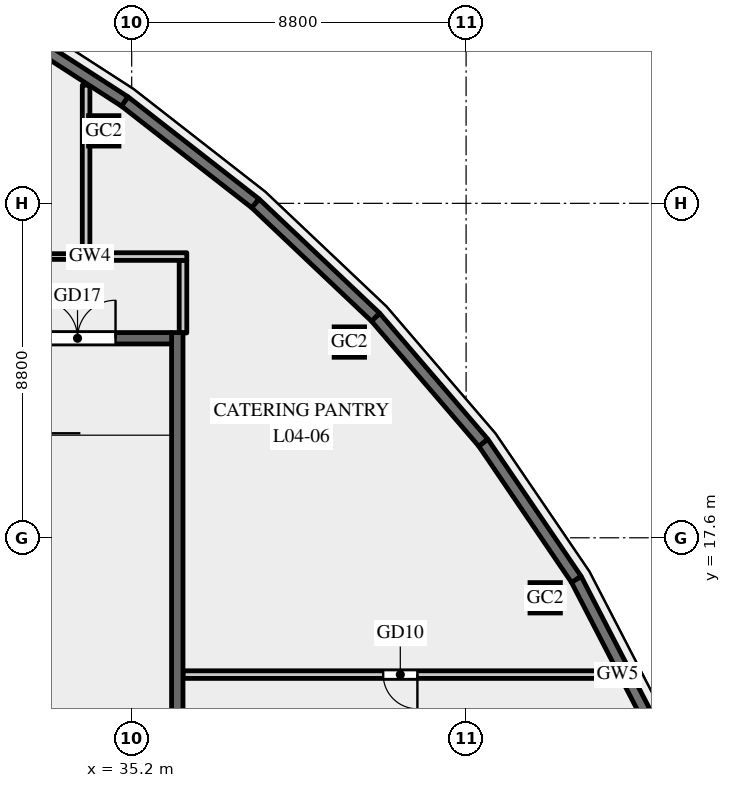
"""IFC4 building model, lengths in metres.
Left out: names, types, materials, properties, quantities, classifications, styles, units other than length and angle.
Written with IfcOpenShell. Run it as: python <this file> out.ifc"""

import sys

from ifc_helpers import new_model, si_unit, direction, frame, frame_2d, origin, origin_2d, place, context, subcontext, project, spatial, rectangle, hollow_rectangle, extrude, element, fill, save


model = new_model("IFC4")
c1 = context("Model", 3, precision=1e-05, world=origin(), true_north=direction((0.0, 1.0)))
c2 = subcontext(c1, "Body", "Model", "MODEL_VIEW")
j1 = project(units=[si_unit("LENGTHUNIT", "METRE"), si_unit("PLANEANGLEUNIT", "RADIAN")], contexts=[c1])
p1 = place(None, origin())
s1 = spatial("IfcSite", under=j1, at=p1, CompositionType="ELEMENT")
p2 = place(p1, origin())
s2 = spatial("IfcBuilding", under=s1, at=p2, CompositionType="ELEMENT")
p3 = place(p2, frame((0.0, 0.0, 25.0)))
s3 = spatial("IfcBuildingStorey", under=s2, at=p3, CompositionType="ELEMENT", Elevation=25.0)
for number, where, z_axis, x_axis in (
    (1, (46.081, 16.021, 0.0), (0.0, 0.0, 1.0), (1.0, 0.0, 0.0)),
    (2, (40.928, 22.75, 0.0), (0.0, 0.0, 1.0), (1.0, 0.0, 0.0)),
    (3, (34.465, 28.307, 0.0), (0.0, 0.0, 1.0), (1.0, 0.0, 0.0)),
):
    element("IfcColumn", number, at=place(p3, frame(where, z_axis=z_axis, x_axis=x_axis)), inside=s3, PredefinedType="COLUMN", context=c2, shape_type="SweptSolid", body=[
        extrude(hollow_rectangle(XDim=0.8, YDim=0.8, WallThickness=0.04, at=origin_2d()), origin(), (0.0, 0.0, 1.0), 5.488),
    ])
p4 = place(p3, frame((34.0, 29.51, 0.0), z_axis=(0.0, 0.0, 1.0), x_axis=(0.0, -1.0, 0.0)))
e4 = element("IfcWall", 4, at=p4, inside=s3, PredefinedType="PARTITIONING", context=c2, shape_type="SweptSolid", body=[
    extrude(rectangle(XDim=4.435, YDim=0.2, at=frame_2d((2.217, 0.0))), origin(), (0.0, 0.0, 1.0), 4.2),
])
p5 = place(p3, frame((34.1, 25.0, 0.0), z_axis=(0.0, 0.0, 1.0), x_axis=(-1.0, 0.0, 0.0)))
e5 = element("IfcWall", 5, at=p5, inside=s3, PredefinedType="PARTITIONING", context=c2, shape_type="SweptSolid", body=[
    extrude(rectangle(XDim=40.175, YDim=0.15, at=frame_2d((20.087, 0.0))), origin(), (0.0, 0.0, 1.0), 4.2),
])
p6 = place(p5, frame((20.887, 0.0, 0.0)))
e6 = element("IfcOpeningElement", 6, at=p6, cuts=e5, PredefinedType="OPENING", context=c2, shape_type="SweptSolid", body=[
    extrude(rectangle(XDim=1.4, YDim=2.1, at=frame_2d((0.7, 1.05))), frame((0.0, 0.085, 0.0), z_axis=(0.0, -1.0, 0.0), x_axis=(1.0, 0.0, 0.0)), (0.0, 0.0, 1.0), 0.17),
])
p7 = place(p3, frame((47.987, 14.0, 0.0), z_axis=(0.0, 0.0, 1.0), x_axis=(-1.0, 0.0, 0.0)))
e7 = element("IfcWall", 7, at=p7, inside=s3, PredefinedType="PARTITIONING", context=c2, shape_type="SweptSolid", body=[
    extrude(rectangle(XDim=11.437, YDim=0.2, at=frame_2d((5.718, 0.0))), origin(), (0.0, 0.0, 1.0), 4.2),
])
p8 = place(p7, frame((5.269, 0.0, 0.0)))
e8 = element("IfcOpeningElement", 8, at=p8, cuts=e7, PredefinedType="OPENING", context=c2, shape_type="SweptSolid", body=[
    extrude(rectangle(XDim=0.9, YDim=2.1, at=frame_2d((0.45, 1.05))), frame((0.0, 0.11, 0.0), z_axis=(0.0, -1.0, 0.0), x_axis=(1.0, 0.0, 0.0)), (0.0, 0.0, 1.0), 0.22),
])
p9 = place(p3, frame((36.55, 22.99, 0.0), z_axis=(0.0, 0.0, 1.0), x_axis=(0.0, 1.0, 0.0)))
e9 = element("IfcWall", 9, at=p9, inside=s3, PredefinedType="PARTITIONING", context=c2, shape_type="SweptSolid", body=[
    extrude(rectangle(XDim=1.91, YDim=0.2, at=frame_2d((0.955, 0.0))), origin(), (0.0, 0.0, 1.0), 5.2),
])
p10 = place(p3, frame((36.65, 25.0, 0.0), z_axis=(0.0, 0.0, 1.0), x_axis=(-1.0, 0.0, 0.0)))
e10 = element("IfcWall", 10, at=p10, inside=s3, PredefinedType="PARTITIONING", context=c2, shape_type="SweptSolid", body=[
    extrude(rectangle(XDim=2.55, YDim=0.2, at=frame_2d((1.275, 0.0))), origin(), (0.0, 0.0, 1.0), 5.2),
])
p11 = place(p3, frame((48.894, 12.649, 0.0), z_axis=(0.0, 0.0, 1.0), x_axis=(-0.459242531468, 0.888310923771, 0.0)))
e11 = element("IfcWall", 11, at=p11, inside=s3, PredefinedType="SOLIDWALL", context=c2, shape_type="SweptSolid", body=[
    extrude(rectangle(XDim=4.345, YDim=0.3, at=frame_2d((2.172, 0.0))), origin(), (0.0, 0.0, 1.0), 5.2),
])
p12 = place(p11, frame((0.972, 0.0, 1.0)))
e12 = element("IfcOpeningElement", 12, at=p12, cuts=e11, PredefinedType="OPENING", context=c2, shape_type="SweptSolid", body=[
    extrude(rectangle(XDim=2.4, YDim=3.0, at=frame_2d((1.2, 1.5))), frame((0.0, 0.16, 0.0), z_axis=(0.0, -1.0, 0.0), x_axis=(1.0, 0.0, 0.0)), (0.0, 0.0, 1.0), 0.32),
])
p13 = place(p3, frame((46.899, 16.508, 0.0), z_axis=(0.0, 0.0, 1.0), x_axis=(-0.562667738859, 0.82668314102, 0.0)))
e13 = element("IfcWall", 13, at=p13, inside=s3, PredefinedType="SOLIDWALL", context=c2, shape_type="SweptSolid", body=[
    extrude(rectangle(XDim=4.349, YDim=0.3, at=frame_2d((2.174, 0.0))), origin(), (0.0, 0.0, 1.0), 5.2),
])
p14 = place(p13, frame((0.974, 0.0, 1.0)))
e14 = element("IfcOpeningElement", 14, at=p14, cuts=e13, PredefinedType="OPENING", context=c2, shape_type="SweptSolid", body=[
    extrude(rectangle(XDim=2.4, YDim=3.0, at=frame_2d((1.2, 1.5))), frame((0.0, 0.16, 0.0), z_axis=(0.0, -1.0, 0.0), x_axis=(1.0, 0.0, 0.0)), (0.0, 0.0, 1.0), 0.32),
])
p15 = place(p3, frame((44.452, 20.104, 0.0), z_axis=(0.0, 0.0, 1.0), x_axis=(-0.651387059497, 0.758745608699, 0.0)))
e15 = element("IfcWall", 15, at=p15, inside=s3, PredefinedType="SOLIDWALL", context=c2, shape_type="SweptSolid", body=[
    extrude(rectangle(XDim=4.353, YDim=0.3, at=frame_2d((2.176, 0.0))), origin(), (0.0, 0.0, 1.0), 5.2),
])
p16 = place(p15, frame((0.976, 0.0, 1.0)))
e16 = element("IfcOpeningElement", 16, at=p16, cuts=e15, PredefinedType="OPENING", context=c2, shape_type="SweptSolid", body=[
    extrude(rectangle(XDim=2.4, YDim=3.0, at=frame_2d((1.2, 1.5))), frame((0.0, 0.16, 0.0), z_axis=(0.0, -1.0, 0.0), x_axis=(1.0, 0.0, 0.0)), (0.0, 0.0, 1.0), 0.32),
])
p17 = place(p3, frame((41.617, 23.406, 0.0), z_axis=(0.0, 0.0, 1.0), x_axis=(-0.72620446032, 0.687478786444, 0.0)))
e17 = element("IfcWall", 17, at=p17, inside=s3, PredefinedType="SOLIDWALL", context=c2, shape_type="SweptSolid", body=[
    extrude(rectangle(XDim=4.356, YDim=0.3, at=frame_2d((2.178, 0.0))), origin(), (0.0, 0.0, 1.0), 5.2),
])
p18 = place(p17, frame((0.978, 0.0, 1.0)))
e18 = element("IfcOpeningElement", 18, at=p18, cuts=e17, PredefinedType="OPENING", context=c2, shape_type="SweptSolid", body=[
    extrude(rectangle(XDim=2.4, YDim=3.0, at=frame_2d((1.2, 1.5))), frame((0.0, 0.16, 0.0), z_axis=(0.0, -1.0, 0.0), x_axis=(1.0, 0.0, 0.0)), (0.0, 0.0, 1.0), 0.32),
])
p19 = place(p3, frame((38.453, 26.401, 0.0), z_axis=(0.0, 0.0, 1.0), x_axis=(-0.788491985196, 0.615045030288, 0.0)))
e19 = element("IfcWall", 19, at=p19, inside=s3, PredefinedType="SOLIDWALL", context=c2, shape_type="SweptSolid", body=[
    extrude(rectangle(XDim=4.359, YDim=0.3, at=frame_2d((2.18, 0.0))), origin(), (0.0, 0.0, 1.0), 5.2),
])
p20 = place(p19, frame((0.98, 0.0, 1.0)))
e20 = element("IfcOpeningElement", 20, at=p20, cuts=e19, PredefinedType="OPENING", context=c2, shape_type="SweptSolid", body=[
    extrude(rectangle(XDim=2.4, YDim=3.0, at=frame_2d((1.2, 1.5))), frame((0.0, 0.16, 0.0), z_axis=(0.0, -1.0, 0.0), x_axis=(1.0, 0.0, 0.0)), (0.0, 0.0, 1.0), 0.32),
])
p21 = place(p3, frame((35.016, 29.082, 0.0), z_axis=(0.0, 0.0, 1.0), x_axis=(-0.840047348843, 0.542513088969, 0.0)))
e21 = element("IfcWall", 21, at=p21, inside=s3, PredefinedType="SOLIDWALL", context=c2, shape_type="SweptSolid", body=[
    extrude(rectangle(XDim=4.362, YDim=0.3, at=frame_2d((2.181, 0.0))), origin(), (0.0, 0.0, 1.0), 5.2),
])
p22 = place(p21, frame((1.291, 0.0, 1.0)))
e22 = element("IfcOpeningElement", 22, at=p22, cuts=e21, PredefinedType="OPENING", context=c2, shape_type="SweptSolid", body=[
    extrude(rectangle(XDim=2.4, YDim=3.0, at=frame_2d((1.2, 1.5))), frame((0.0, 0.16, 0.0), z_axis=(0.0, -1.0, 0.0), x_axis=(1.0, 0.0, 0.0)), (0.0, 0.0, 1.0), 0.32),
])
p23 = place(p3, frame((36.4, 12.0, 0.0), z_axis=(0.0, 0.0, 1.0), x_axis=(0.0, 1.0, 0.0)))
e23 = element("IfcWall", 23, at=p23, inside=s3, PredefinedType="SHEAR", context=c2, shape_type="SweptSolid", body=[
    extrude(rectangle(XDim=11.0, YDim=0.3, at=frame_2d((5.5, 0.0))), origin(), (0.0, 0.0, 1.0), 5.2),
])
p24 = place(p3, frame((31.3, 22.85, 0.0), z_axis=(0.0, 0.0, 1.0), x_axis=(1.0, 0.0, 0.0)))
e24 = element("IfcWall", 24, at=p24, inside=s3, PredefinedType="SHEAR", context=c2, shape_type="SweptSolid", body=[
    extrude(rectangle(XDim=4.95, YDim=0.3, at=frame_2d((2.475, 0.0))), origin(), (0.0, 0.0, 1.0), 5.2),
])
p25 = place(p24, frame((1.475, 0.0, 0.0)))
e25 = element("IfcOpeningElement", 25, at=p25, cuts=e24, PredefinedType="OPENING", context=c2, shape_type="SweptSolid", body=[
    extrude(rectangle(XDim=2.0, YDim=2.1, at=frame_2d((1.0, 1.05))), frame((0.0, 0.16, 0.0), z_axis=(0.0, -1.0, 0.0), x_axis=(1.0, 0.0, 0.0)), (0.0, 0.0, 1.0), 0.32),
])
p26 = place(p8, origin())
e26 = element("IfcDoor", 26, at=p26, inside=s3, OperationType="SINGLE_SWING_LEFT", PredefinedType="DOOR", context=c2, shape_type="SweptSolid", body=[
    extrude(rectangle(XDim=0.9, YDim=2.1, at=frame_2d((0.45, 1.05))), frame((0.0, 0.025, 0.0), z_axis=(0.0, -1.0, 0.0), x_axis=(1.0, 0.0, 0.0)), (0.0, 0.0, 1.0), 0.05),
])
fill(e8, e26)
p27 = place(p12, origin())
e27 = element("IfcWindow", 27, at=p27, inside=s3, PartitioningType="SINGLE_PANEL", PredefinedType="WINDOW", context=c2, shape_type="SweptSolid", body=[
    extrude(rectangle(XDim=2.4, YDim=3.0, at=frame_2d((1.2, 1.5))), frame((0.0, 0.03, 0.0), z_axis=(0.0, -1.0, 0.0), x_axis=(1.0, 0.0, 0.0)), (0.0, 0.0, 1.0), 0.06),
])
fill(e12, e27)
p28 = place(p14, origin())
e28 = element("IfcWindow", 28, at=p28, inside=s3, PartitioningType="SINGLE_PANEL", PredefinedType="WINDOW", context=c2, shape_type="SweptSolid", body=[
    extrude(rectangle(XDim=2.4, YDim=3.0, at=frame_2d((1.2, 1.5))), frame((0.0, 0.03, 0.0), z_axis=(0.0, -1.0, 0.0), x_axis=(1.0, 0.0, 0.0)), (0.0, 0.0, 1.0), 0.06),
])
fill(e14, e28)
p29 = place(p16, origin())
e29 = element("IfcWindow", 29, at=p29, inside=s3, PartitioningType="SINGLE_PANEL", PredefinedType="WINDOW", context=c2, shape_type="SweptSolid", body=[
    extrude(rectangle(XDim=2.4, YDim=3.0, at=frame_2d((1.2, 1.5))), frame((0.0, 0.03, 0.0), z_axis=(0.0, -1.0, 0.0), x_axis=(1.0, 0.0, 0.0)), (0.0, 0.0, 1.0), 0.06),
])
fill(e16, e29)
p30 = place(p18, origin())
e30 = element("IfcWindow", 30, at=p30, inside=s3, PartitioningType="SINGLE_PANEL", PredefinedType="WINDOW", context=c2, shape_type="SweptSolid", body=[
    extrude(rectangle(XDim=2.4, YDim=3.0, at=frame_2d((1.2, 1.5))), frame((0.0, 0.03, 0.0), z_axis=(0.0, -1.0, 0.0), x_axis=(1.0, 0.0, 0.0)), (0.0, 0.0, 1.0), 0.06),
])
fill(e18, e30)
p31 = place(p20, origin())
e31 = element("IfcWindow", 31, at=p31, inside=s3, PartitioningType="SINGLE_PANEL", PredefinedType="WINDOW", context=c2, shape_type="SweptSolid", body=[
    extrude(rectangle(XDim=2.4, YDim=3.0, at=frame_2d((1.2, 1.5))), frame((0.0, 0.03, 0.0), z_axis=(0.0, -1.0, 0.0), x_axis=(1.0, 0.0, 0.0)), (0.0, 0.0, 1.0), 0.06),
])
fill(e20, e31)
p32 = place(p22, origin())
e32 = element("IfcWindow", 32, at=p32, inside=s3, PartitioningType="SINGLE_PANEL", PredefinedType="WINDOW", context=c2, shape_type="SweptSolid", body=[
    extrude(rectangle(XDim=2.4, YDim=3.0, at=frame_2d((1.2, 1.5))), frame((0.0, 0.03, 0.0), z_axis=(0.0, -1.0, 0.0), x_axis=(1.0, 0.0, 0.0)), (0.0, 0.0, 1.0), 0.06),
])
fill(e22, e32)
p33 = place(p25, origin())
e33 = element("IfcDoor", 33, at=p33, inside=s3, OperationType="DOUBLE_DOOR_SINGLE_SWING", PredefinedType="DOOR", context=c2, shape_type="SweptSolid", body=[
    extrude(rectangle(XDim=2.0, YDim=2.1, at=frame_2d((1.0, 1.05))), frame((0.0, 0.025, 0.0), z_axis=(0.0, -1.0, 0.0), x_axis=(1.0, 0.0, 0.0)), (0.0, 0.0, 1.0), 0.05),
])
fill(e25, e33)
save(model, sys.argv[1])
